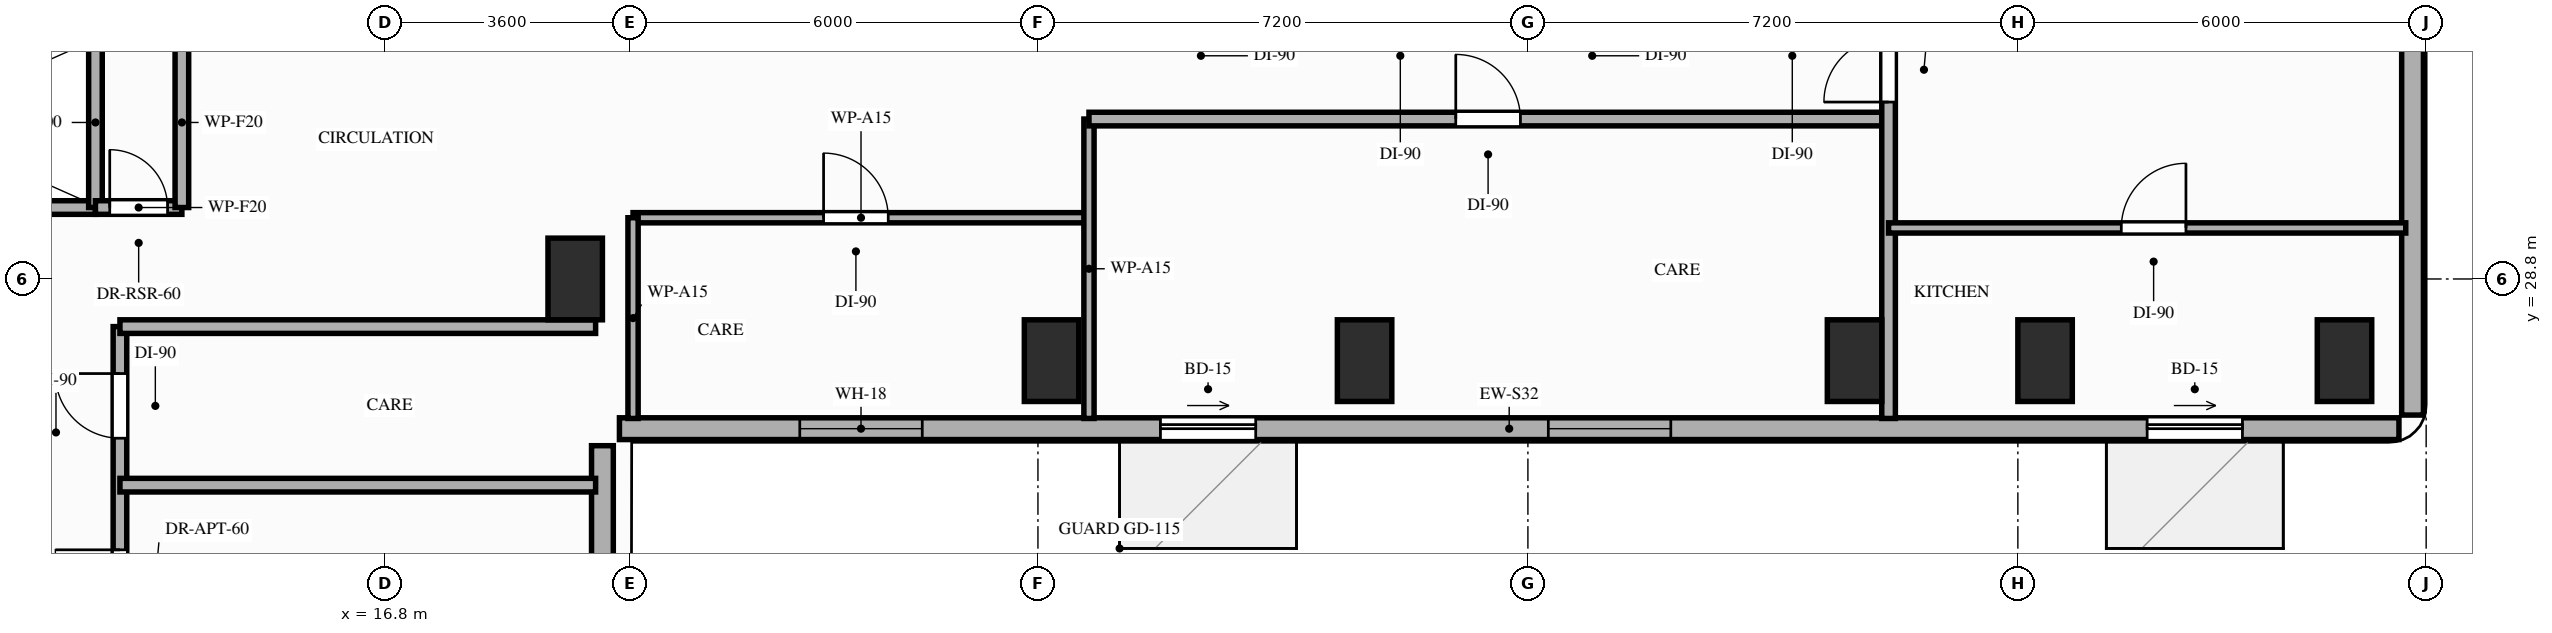
"""IFC4 building model, lengths in metres.
Left out: names, types, materials, properties, quantities, classifications, styles, units other than length and angle.
Written with IfcOpenShell. Run it as: python <this file> out.ifc"""

import sys

from ifc_helpers import new_model, si_unit, direction, frame, frame_2d, origin, origin_2d, place, context, subcontext, project, spatial, rectangle, extrude, element, fill, save


model = new_model("IFC4")
c1 = context("Model", 3, precision=1e-05, world=origin(), true_north=direction((0.0, 1.0)))
c2 = subcontext(c1, "Body", "Model", "MODEL_VIEW")
j1 = project(units=[si_unit("LENGTHUNIT", "METRE"), si_unit("PLANEANGLEUNIT", "RADIAN")], contexts=[c1])
p1 = place(None, origin())
s1 = spatial("IfcSite", under=j1, at=p1, CompositionType="ELEMENT")
p2 = place(p1, origin())
s2 = spatial("IfcBuilding", under=s1, at=p2, CompositionType="ELEMENT")
p3 = place(p2, frame((0.0, 0.0, 93.0)))
s3 = spatial("IfcBuildingStorey", under=s2, at=p3, CompositionType="ELEMENT", Elevation=93.0)
for number, where, z_axis, x_axis in (
    (1, (19.6, 28.8, 0.0), (0.0, 0.0, 1.0), (1.0, 0.0, 0.0)),
    (2, (26.6, 27.6, 0.0), (0.0, 0.0, 1.0), (1.0, 0.0, 0.0)),
    (3, (31.2, 27.6, 0.0), (0.0, 0.0, 1.0), (1.0, 0.0, 0.0)),
    (4, (38.4, 27.6, 0.0), (0.0, 0.0, 1.0), (1.0, 0.0, 0.0)),
    (5, (41.2, 27.6, 0.0), (0.0, 0.0, 1.0), (1.0, 0.0, 0.0)),
    (6, (45.6, 27.6, 0.0), (0.0, 0.0, 1.0), (1.0, 0.0, 0.0)),
):
    element("IfcColumn", number, at=place(p3, frame(where, z_axis=z_axis, x_axis=x_axis)), inside=s3, PredefinedType="COLUMN", context=c2, shape_type="SweptSolid", body=[
        extrude(rectangle(XDim=0.8, YDim=1.2, at=origin_2d()), origin(), (0.0, 0.0, 1.0), 3.2),
    ])
p4 = place(p3, frame((20.0, 8.8, 0.0), z_axis=(0.0, 0.0, 1.0), x_axis=(0.0, 1.0, 0.0)))
e7 = element("IfcWall", 7, at=p4, inside=s3, PredefinedType="STANDARD", context=c2, shape_type="SweptSolid", body=[
    extrude(rectangle(XDim=17.55, YDim=0.32, at=frame_2d((8.775, 0.0))), origin(), (0.0, 0.0, 1.0), 2.41),
])
p5 = place(p4, frame((12.6, 0.0, 0.85)))
e8 = element("IfcOpeningElement", 8, at=p5, cuts=e7, PredefinedType="OPENING", context=c2, shape_type="SweptSolid", body=[
    extrude(rectangle(XDim=1.1, YDim=1.31, at=frame_2d((0.55, 0.655))), frame((0.0, 0.17, 0.0), z_axis=(0.0, -1.0, 0.0), x_axis=(1.0, 0.0, 0.0)), (0.0, 0.0, 1.0), 0.34),
])
p6 = place(p4, frame((5.6, 0.0, 0.85)))
e9 = element("IfcOpeningElement", 9, at=p6, cuts=e7, PredefinedType="OPENING", context=c2, shape_type="SweptSolid", body=[
    extrude(rectangle(XDim=1.8, YDim=1.31, at=frame_2d((0.9, 0.655))), frame((0.0, 0.17, 0.0), z_axis=(0.0, -1.0, 0.0), x_axis=(1.0, 0.0, 0.0)), (0.0, 0.0, 1.0), 0.34),
])
p7 = place(p3, frame((20.25, 26.6, 0.0), z_axis=(0.0, 0.0, 1.0), x_axis=(1.0, 0.0, 0.0)))
e10 = element("IfcWall", 10, at=p7, inside=s3, PredefinedType="STANDARD", context=c2, shape_type="SweptSolid", body=[
    extrude(rectangle(XDim=26.15, YDim=0.32, at=frame_2d((13.075, 0.0))), origin(), (0.0, 0.0, 1.0), 2.7),
])
p8 = place(p7, frame((7.95, 0.0, 0.0)))
e11 = element("IfcOpeningElement", 11, at=p8, cuts=e10, PredefinedType="OPENING", context=c2, shape_type="SweptSolid", body=[
    extrude(rectangle(XDim=1.4, YDim=2.1, at=frame_2d((0.7, 1.05))), frame((0.0, 0.17, 0.0), z_axis=(0.0, -1.0, 0.0), x_axis=(1.0, 0.0, 0.0)), (0.0, 0.0, 1.0), 0.34),
])
p9 = place(p7, frame((22.45, 0.0, 0.0)))
e12 = element("IfcOpeningElement", 12, at=p9, cuts=e10, PredefinedType="OPENING", context=c2, shape_type="SweptSolid", body=[
    extrude(rectangle(XDim=1.4, YDim=2.1, at=frame_2d((0.7, 1.05))), frame((0.0, 0.17, 0.0), z_axis=(0.0, -1.0, 0.0), x_axis=(1.0, 0.0, 0.0)), (0.0, 0.0, 1.0), 0.34),
])
p10 = place(p7, frame((2.65, 0.0, 0.85)))
e13 = element("IfcOpeningElement", 13, at=p10, cuts=e10, PredefinedType="OPENING", context=c2, shape_type="SweptSolid", body=[
    extrude(rectangle(XDim=1.8, YDim=1.6, at=frame_2d((0.9, 0.8))), frame((0.0, 0.17, 0.0), z_axis=(0.0, -1.0, 0.0), x_axis=(1.0, 0.0, 0.0)), (0.0, 0.0, 1.0), 0.34),
])
p11 = place(p7, frame((13.65, 0.0, 0.85)))
e14 = element("IfcOpeningElement", 14, at=p11, cuts=e10, PredefinedType="OPENING", context=c2, shape_type="SweptSolid", body=[
    extrude(rectangle(XDim=1.8, YDim=1.6, at=frame_2d((0.9, 0.8))), frame((0.0, 0.17, 0.0), z_axis=(0.0, -1.0, 0.0), x_axis=(1.0, 0.0, 0.0)), (0.0, 0.0, 1.0), 0.34),
])
p12 = place(p3, frame((46.6, 26.8, 0.0), z_axis=(0.0, 0.0, 1.0), x_axis=(0.0, 1.0, 0.0)))
e15 = element("IfcWall", 15, at=p12, inside=s3, PredefinedType="STANDARD", context=c2, shape_type="SweptSolid", body=[
    extrude(rectangle(XDim=15.35, YDim=0.32, at=frame_2d((7.675, 0.0))), origin(), (0.0, 0.0, 1.0), 3.02),
])
p13 = place(p12, frame((6.13, 0.0, 0.85)))
e16 = element("IfcOpeningElement", 16, at=p13, cuts=e15, PredefinedType="OPENING", context=c2, shape_type="SweptSolid", body=[
    extrude(rectangle(XDim=1.8, YDim=1.75, at=frame_2d((0.9, 0.875))), frame((0.0, 0.17, 0.0), z_axis=(0.0, -1.0, 0.0), x_axis=(1.0, 0.0, 0.0)), (0.0, 0.0, 1.0), 0.34),
])
p14 = place(p3, frame((7.0, 29.85, 0.0), z_axis=(0.0, 0.0, 1.0), x_axis=(1.0, 0.0, 0.0)))
e17 = element("IfcWall", 17, at=p14, inside=s3, PredefinedType="MOVABLE", context=c2, shape_type="SweptSolid", body=[
    extrude(rectangle(XDim=5.55, YDim=0.2, at=frame_2d((2.775, 0.0))), origin(), (0.0, 0.0, 1.0), 3.02),
])
p15 = place(p3, frame((12.55, 29.85, 0.0), z_axis=(0.0, 0.0, 1.0), x_axis=(0.0, 1.0, 0.0)))
e18 = element("IfcWall", 18, at=p15, inside=s3, PredefinedType="MOVABLE", context=c2, shape_type="SweptSolid", body=[
    extrude(rectangle(XDim=2.5, YDim=0.2, at=frame_2d((1.25, 0.0))), origin(), (0.0, 0.0, 1.0), 3.02),
])
p16 = place(p3, frame((12.55, 29.85, 0.0), z_axis=(0.0, 0.0, 1.0), x_axis=(1.0, 0.0, 0.0)))
e19 = element("IfcWall", 19, at=p16, inside=s3, PredefinedType="PARTITIONING", context=c2, shape_type="SweptSolid", body=[
    extrude(rectangle(XDim=1.27, YDim=0.2, at=frame_2d((0.635, 0.0))), origin(), (0.0, 0.0, 1.0), 3.02),
])
p17 = place(p16, frame((0.21, 0.0, 0.0)))
e20 = element("IfcOpeningElement", 20, at=p17, cuts=e19, PredefinedType="OPENING", context=c2, shape_type="SweptSolid", body=[
    extrude(rectangle(XDim=0.85, YDim=2.05, at=frame_2d((0.425, 1.025))), frame((0.0, 0.11, 0.0), z_axis=(0.0, -1.0, 0.0), x_axis=(1.0, 0.0, 0.0)), (0.0, 0.0, 1.0), 0.22),
])
p18 = place(p3, frame((13.82, 29.85, 0.0), z_axis=(0.0, 0.0, 1.0), x_axis=(0.0, 1.0, 0.0)))
e21 = element("IfcWall", 21, at=p18, inside=s3, PredefinedType="PARTITIONING", context=c2, shape_type="SweptSolid", body=[
    extrude(rectangle(XDim=2.5, YDim=0.2, at=frame_2d((1.25, 0.0))), origin(), (0.0, 0.0, 1.0), 3.02),
])
p19 = place(p3, frame((12.91, 16.6, 0.0), z_axis=(0.0, 0.0, 1.0), x_axis=(0.0, 1.0, 0.0)))
e22 = element("IfcWall", 22, at=p19, inside=s3, PredefinedType="PARTITIONING", context=c2, shape_type="SweptSolid", body=[
    extrude(rectangle(XDim=11.5, YDim=0.2, at=frame_2d((5.75, 0.0))), origin(), (0.0, 0.0, 1.0), 2.41),
])
p20 = place(p19, frame((0.45, 0.0, 0.0)))
e23 = element("IfcOpeningElement", 23, at=p20, cuts=e22, PredefinedType="OPENING", context=c2, shape_type="SweptSolid", body=[
    extrude(rectangle(XDim=0.95, YDim=2.15, at=frame_2d((0.475, 1.075))), frame((0.0, 0.11, 0.0), z_axis=(0.0, -1.0, 0.0), x_axis=(1.0, 0.0, 0.0)), (0.0, 0.0, 1.0), 0.22),
])
p21 = place(p19, frame((2.75, 0.0, 0.0)))
e24 = element("IfcOpeningElement", 24, at=p21, cuts=e22, PredefinedType="OPENING", context=c2, shape_type="SweptSolid", body=[
    extrude(rectangle(XDim=0.95, YDim=2.1, at=frame_2d((0.475, 1.05))), frame((0.0, 0.11, 0.0), z_axis=(0.0, -1.0, 0.0), x_axis=(1.0, 0.0, 0.0)), (0.0, 0.0, 1.0), 0.22),
])
p22 = place(p19, frame((9.86, 0.0, 0.0)))
e25 = element("IfcOpeningElement", 25, at=p22, cuts=e22, PredefinedType="OPENING", context=c2, shape_type="SweptSolid", body=[
    extrude(rectangle(XDim=0.95, YDim=2.15, at=frame_2d((0.475, 1.075))), frame((0.0, 0.11, 0.0), z_axis=(0.0, -1.0, 0.0), x_axis=(1.0, 0.0, 0.0)), (0.0, 0.0, 1.0), 0.22),
])
p23 = place(p19, frame((7.27, 0.0, 0.0)))
e26 = element("IfcOpeningElement", 26, at=p23, cuts=e22, PredefinedType="OPENING", context=c2, shape_type="SweptSolid", body=[
    extrude(rectangle(XDim=0.95, YDim=2.15, at=frame_2d((0.475, 1.075))), frame((0.0, 0.11, 0.0), z_axis=(0.0, -1.0, 0.0), x_axis=(1.0, 0.0, 0.0)), (0.0, 0.0, 1.0), 0.22),
])
p24 = place(p3, frame((12.91, 28.1, 0.0), z_axis=(0.0, 0.0, 1.0), x_axis=(1.0, 0.0, 0.0)))
e27 = element("IfcWall", 27, at=p24, inside=s3, PredefinedType="PARTITIONING", context=c2, shape_type="SweptSolid", body=[
    extrude(rectangle(XDim=6.99, YDim=0.2, at=frame_2d((3.495, 0.0))), origin(), (0.0, 0.0, 1.0), 2.41),
])
p25 = place(p3, frame((20.45, 29.7, 0.0), z_axis=(0.0, 0.0, 1.0), x_axis=(1.0, 0.0, 0.0)))
e28 = element("IfcWall", 28, at=p25, inside=s3, PredefinedType="PARTITIONING", context=c2, shape_type="SweptSolid", body=[
    extrude(rectangle(XDim=6.7, YDim=0.15, at=frame_2d((3.35, 0.0))), origin(), (0.0, 0.0, 1.0), 3.02),
])
p26 = place(p25, frame((2.8, 0.0, 0.0)))
e29 = element("IfcOpeningElement", 29, at=p26, cuts=e28, PredefinedType="OPENING", context=c2, shape_type="SweptSolid", body=[
    extrude(rectangle(XDim=0.95, YDim=2.15, at=frame_2d((0.475, 1.075))), frame((0.0, 0.085, 0.0), z_axis=(0.0, -1.0, 0.0), x_axis=(1.0, 0.0, 0.0)), (0.0, 0.0, 1.0), 0.17),
])
p27 = place(p3, frame((20.45, 26.75, 0.0), z_axis=(0.0, 0.0, 1.0), x_axis=(0.0, 1.0, 0.0)))
e30 = element("IfcWall", 30, at=p27, inside=s3, PredefinedType="PARTITIONING", context=c2, shape_type="SweptSolid", body=[
    extrude(rectangle(XDim=2.95, YDim=0.15, at=frame_2d((1.475, 0.0))), origin(), (0.0, 0.0, 1.0), 2.41),
])
p28 = place(p3, frame((27.15, 26.75, 0.0), z_axis=(0.0, 0.0, 1.0), x_axis=(0.0, 1.0, 0.0)))
e31 = element("IfcWall", 31, at=p28, inside=s3, PredefinedType="PARTITIONING", context=c2, shape_type="SweptSolid", body=[
    extrude(rectangle(XDim=4.4, YDim=0.15, at=frame_2d((2.2, 0.0))), origin(), (0.0, 0.0, 1.0), 2.41),
])
p29 = place(p3, frame((12.91, 25.77, 0.0), z_axis=(0.0, 0.0, 1.0), x_axis=(1.0, 0.0, 0.0)))
e32 = element("IfcWall", 32, at=p29, inside=s3, PredefinedType="PARTITIONING", context=c2, shape_type="SweptSolid", body=[
    extrude(rectangle(XDim=6.99, YDim=0.2, at=frame_2d((3.495, 0.0))), origin(), (0.0, 0.0, 1.0), 2.41),
])
p30 = place(p3, frame((27.15, 31.15, 0.0), z_axis=(0.0, 0.0, 1.0), x_axis=(1.0, 0.0, 0.0)))
e33 = element("IfcWall", 33, at=p30, inside=s3, PredefinedType="PARTITIONING", context=c2, shape_type="SweptSolid", body=[
    extrude(rectangle(XDim=11.75, YDim=0.2, at=frame_2d((5.875, 0.0))), origin(), (0.0, 0.0, 1.0), 2.41),
])
p31 = place(p30, frame((5.39, 0.0, 0.0)))
e34 = element("IfcOpeningElement", 34, at=p31, cuts=e33, PredefinedType="OPENING", context=c2, shape_type="SweptSolid", body=[
    extrude(rectangle(XDim=0.95, YDim=2.15, at=frame_2d((0.475, 1.075))), frame((0.0, 0.11, 0.0), z_axis=(0.0, -1.0, 0.0), x_axis=(1.0, 0.0, 0.0)), (0.0, 0.0, 1.0), 0.22),
])
p32 = place(p3, frame((38.9, 26.75, 0.0), z_axis=(0.0, 0.0, 1.0), x_axis=(0.0, 1.0, 0.0)))
e35 = element("IfcWall", 35, at=p32, inside=s3, PredefinedType="PARTITIONING", context=c2, shape_type="SweptSolid", body=[
    extrude(rectangle(XDim=15.45, YDim=0.2, at=frame_2d((7.725, 0.0))), origin(), (0.0, 0.0, 1.0), 2.41),
])
p33 = place(p32, frame((4.65, 0.0, 0.0)))
e36 = element("IfcOpeningElement", 36, at=p33, cuts=e35, PredefinedType="OPENING", context=c2, shape_type="SweptSolid", body=[
    extrude(rectangle(XDim=0.95, YDim=2.15, at=frame_2d((0.475, 1.075))), frame((0.0, 0.11, 0.0), z_axis=(0.0, -1.0, 0.0), x_axis=(1.0, 0.0, 0.0)), (0.0, 0.0, 1.0), 0.22),
])
p34 = place(p3, frame((38.9, 29.55, 0.0), z_axis=(0.0, 0.0, 1.0), x_axis=(1.0, 0.0, 0.0)))
e37 = element("IfcWall", 37, at=p34, inside=s3, PredefinedType="PARTITIONING", context=c2, shape_type="SweptSolid", body=[
    extrude(rectangle(XDim=7.6, YDim=0.15, at=frame_2d((3.8, 0.0))), origin(), (0.0, 0.0, 1.0), 2.41),
])
p35 = place(p34, frame((3.42, 0.0, 0.0)))
e38 = element("IfcOpeningElement", 38, at=p35, cuts=e37, PredefinedType="OPENING", context=c2, shape_type="SweptSolid", body=[
    extrude(rectangle(XDim=0.95, YDim=2.15, at=frame_2d((0.475, 1.075))), frame((0.0, 0.085, 0.0), z_axis=(0.0, -1.0, 0.0), x_axis=(1.0, 0.0, 0.0)), (0.0, 0.0, 1.0), 0.17),
])
p36 = place(p8, origin())
e39 = element("IfcDoor", 39, at=p36, inside=s3, OperationType="SLIDING_TO_RIGHT", PredefinedType="DOOR", context=c2, shape_type="SweptSolid", body=[
    extrude(rectangle(XDim=1.4, YDim=2.1, at=frame_2d((0.7, 1.05))), frame((0.0, 0.025, 0.0), z_axis=(0.0, -1.0, 0.0), x_axis=(1.0, 0.0, 0.0)), (0.0, 0.0, 1.0), 0.05),
])
fill(e11, e39)
p37 = place(p9, origin())
e40 = element("IfcDoor", 40, at=p37, inside=s3, OperationType="SLIDING_TO_RIGHT", PredefinedType="DOOR", context=c2, shape_type="SweptSolid", body=[
    extrude(rectangle(XDim=1.4, YDim=2.1, at=frame_2d((0.7, 1.05))), frame((0.0, 0.025, 0.0), z_axis=(0.0, -1.0, 0.0), x_axis=(1.0, 0.0, 0.0)), (0.0, 0.0, 1.0), 0.05),
])
fill(e12, e40)
p38 = place(p10, origin())
e41 = element("IfcWindow", 41, at=p38, inside=s3, PartitioningType="SINGLE_PANEL", PredefinedType="WINDOW", context=c2, shape_type="SweptSolid", body=[
    extrude(rectangle(XDim=1.8, YDim=1.6, at=frame_2d((0.9, 0.8))), frame((0.0, 0.03, 0.0), z_axis=(0.0, -1.0, 0.0), x_axis=(1.0, 0.0, 0.0)), (0.0, 0.0, 1.0), 0.06),
])
fill(e13, e41)
p39 = place(p11, origin())
e42 = element("IfcWindow", 42, at=p39, inside=s3, PartitioningType="SINGLE_PANEL", PredefinedType="WINDOW", context=c2, shape_type="SweptSolid", body=[
    extrude(rectangle(XDim=1.8, YDim=1.6, at=frame_2d((0.9, 0.8))), frame((0.0, 0.03, 0.0), z_axis=(0.0, -1.0, 0.0), x_axis=(1.0, 0.0, 0.0)), (0.0, 0.0, 1.0), 0.06),
])
fill(e14, e42)
p40 = place(p17, origin())
e43 = element("IfcDoor", 43, at=p40, inside=s3, OperationType="SINGLE_SWING_LEFT", PredefinedType="DOOR", context=c2, shape_type="SweptSolid", body=[
    extrude(rectangle(XDim=0.85, YDim=2.05, at=frame_2d((0.425, 1.025))), frame((0.0, 0.025, 0.0), z_axis=(0.0, -1.0, 0.0), x_axis=(1.0, 0.0, 0.0)), (0.0, 0.0, 1.0), 0.05),
])
fill(e20, e43)
p41 = place(p26, origin())
e44 = element("IfcDoor", 44, at=p41, inside=s3, OperationType="SINGLE_SWING_LEFT", PredefinedType="DOOR", context=c2, shape_type="SweptSolid", body=[
    extrude(rectangle(XDim=0.95, YDim=2.15, at=frame_2d((0.475, 1.075))), frame((0.0, 0.025, 0.0), z_axis=(0.0, -1.0, 0.0), x_axis=(1.0, 0.0, 0.0)), (0.0, 0.0, 1.0), 0.05),
])
fill(e29, e44)
p42 = place(p22, origin())
e45 = element("IfcDoor", 45, at=p42, inside=s3, OperationType="SINGLE_SWING_RIGHT", PredefinedType="DOOR", context=c2, shape_type="SweptSolid", body=[
    extrude(rectangle(XDim=0.95, YDim=2.15, at=frame_2d((0.475, 1.075))), frame((0.0, 0.025, 0.0), z_axis=(0.0, -1.0, 0.0), x_axis=(1.0, 0.0, 0.0)), (0.0, 0.0, 1.0), 0.05),
])
fill(e25, e45)
p43 = place(p23, origin())
e46 = element("IfcDoor", 46, at=p43, inside=s3, OperationType="SINGLE_SWING_RIGHT", PredefinedType="DOOR", context=c2, shape_type="SweptSolid", body=[
    extrude(rectangle(XDim=0.95, YDim=2.15, at=frame_2d((0.475, 1.075))), frame((0.0, 0.025, 0.0), z_axis=(0.0, -1.0, 0.0), x_axis=(1.0, 0.0, 0.0)), (0.0, 0.0, 1.0), 0.05),
])
fill(e26, e46)
p44 = place(p33, origin())
e47 = element("IfcDoor", 47, at=p44, inside=s3, OperationType="SINGLE_SWING_LEFT", PredefinedType="DOOR", context=c2, shape_type="SweptSolid", body=[
    extrude(rectangle(XDim=0.95, YDim=2.15, at=frame_2d((0.475, 1.075))), frame((0.0, 0.025, 0.0), z_axis=(0.0, -1.0, 0.0), x_axis=(1.0, 0.0, 0.0)), (0.0, 0.0, 1.0), 0.05),
])
fill(e36, e47)
p45 = place(p35, origin())
e48 = element("IfcDoor", 48, at=p45, inside=s3, OperationType="SINGLE_SWING_RIGHT", PredefinedType="DOOR", context=c2, shape_type="SweptSolid", body=[
    extrude(rectangle(XDim=0.95, YDim=2.15, at=frame_2d((0.475, 1.075))), frame((0.0, 0.025, 0.0), z_axis=(0.0, -1.0, 0.0), x_axis=(1.0, 0.0, 0.0)), (0.0, 0.0, 1.0), 0.05),
])
fill(e38, e48)
p46 = place(p31, origin())
e49 = element("IfcDoor", 49, at=p46, inside=s3, OperationType="SINGLE_SWING_LEFT", PredefinedType="DOOR", context=c2, shape_type="SweptSolid", body=[
    extrude(rectangle(XDim=0.95, YDim=2.15, at=frame_2d((0.475, 1.075))), frame((0.0, 0.025, 0.0), z_axis=(0.0, -1.0, 0.0), x_axis=(1.0, 0.0, 0.0)), (0.0, 0.0, 1.0), 0.05),
])
fill(e34, e49)
save(model, sys.argv[1])
